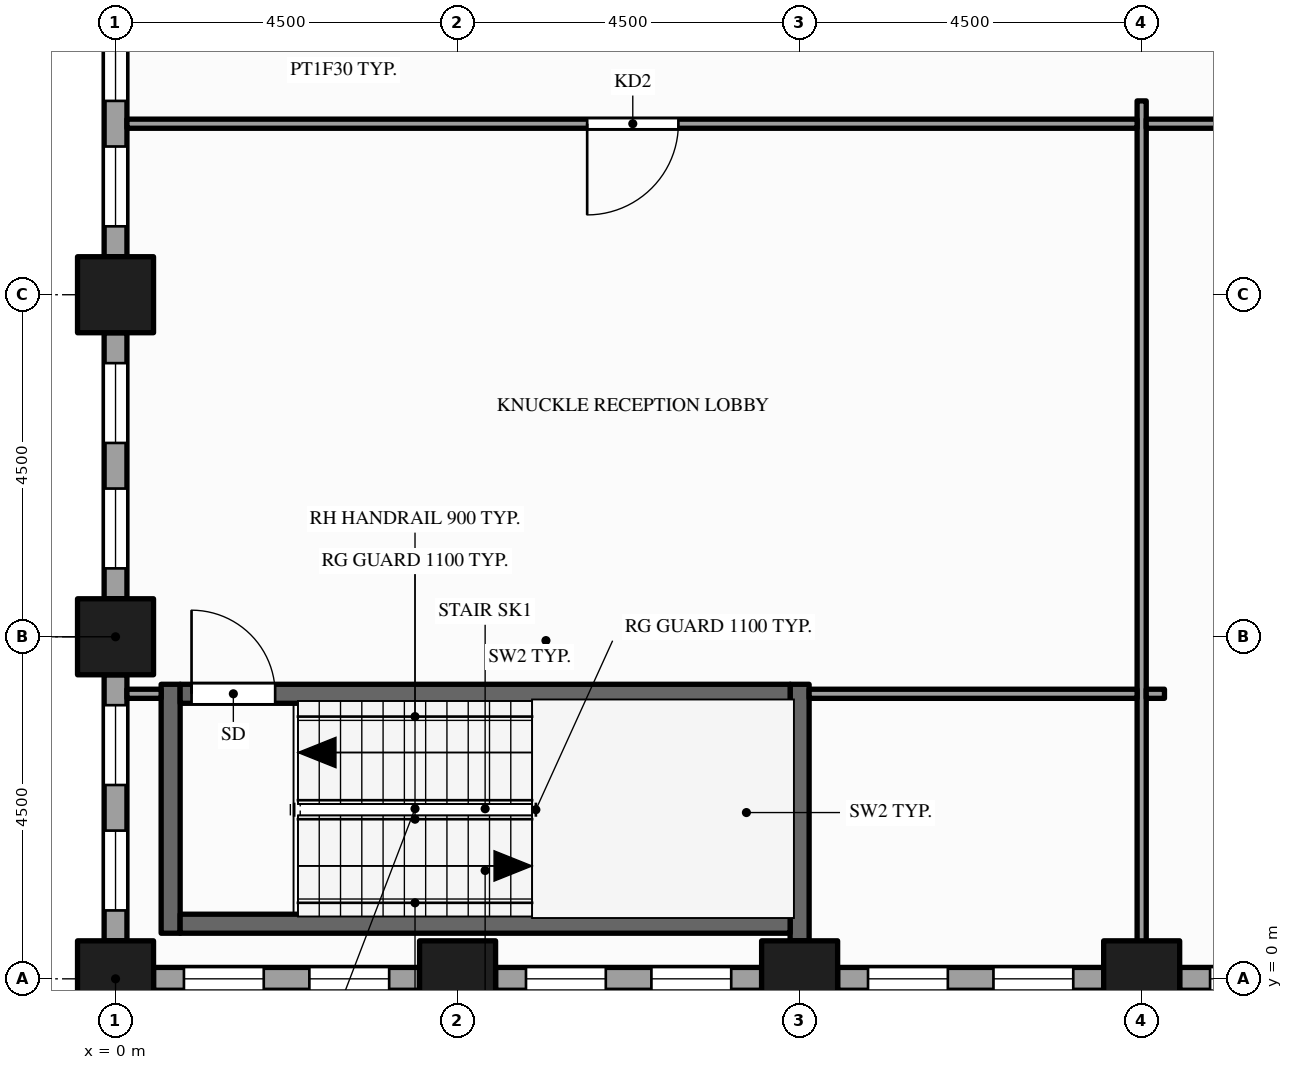
"""IFC4 building model, lengths in metres.
Left out: names, types, materials, properties, quantities, classifications, styles, units other than length and angle.
Written with IfcOpenShell. Run it as: python <this file> out.ifc"""

import sys

from ifc_helpers import new_model, si_unit, direction, frame, frame_2d, origin, origin_2d, place, context, subcontext, project, spatial, rectangle, hollow_rectangle, extrude, element, fill, save


model = new_model("IFC4")
c1 = context("Model", 3, precision=1e-05, world=origin(), true_north=direction((0.0, 1.0)))
c2 = subcontext(c1, "Body", "Model", "MODEL_VIEW")
j1 = project(units=[si_unit("LENGTHUNIT", "METRE"), si_unit("PLANEANGLEUNIT", "RADIAN")], contexts=[c1])
p1 = place(None, origin())
s1 = spatial("IfcSite", under=j1, at=p1, CompositionType="ELEMENT")
p2 = place(p1, origin())
s2 = spatial("IfcBuilding", under=s1, at=p2, CompositionType="ELEMENT")
p3 = place(p2, frame((0.0, 0.0, 123.0)))
s3 = spatial("IfcBuildingStorey", under=s2, at=p3, CompositionType="ELEMENT", Elevation=123.0)
for number, where, z_axis, x_axis in (
    (1, (0.0, 0.0, -0.15), (0.0, 0.0, 1.0), (1.0, 0.0, 0.0)),
    (2, (0.0, 4.5, -0.15), (0.0, 0.0, 1.0), (1.0, 0.0, 0.0)),
    (3, (0.0, 9.0, -0.15), (0.0, 0.0, 1.0), (1.0, 0.0, 0.0)),
    (4, (4.5, 0.0, -0.15), (0.0, 0.0, 1.0), (1.0, 0.0, 0.0)),
    (5, (9.0, 0.0, -0.15), (0.0, 0.0, 1.0), (1.0, 0.0, 0.0)),
    (6, (13.5, 0.0, -0.15), (0.0, 0.0, 1.0), (1.0, 0.0, 0.0)),
):
    element("IfcColumn", number, at=place(p3, frame(where, z_axis=z_axis, x_axis=x_axis)), inside=s3, PredefinedType="COLUMN", context=c2, shape_type="SweptSolid", body=[
        extrude(hollow_rectangle(XDim=1.0, YDim=1.0, WallThickness=0.05, at=origin_2d()), origin(), (0.0, 0.0, 1.0), 4.0),
    ])
p4 = place(p3, frame((0.0, 13.0, 0.0), z_axis=(0.0, 0.0, 1.0), x_axis=(0.0, -1.0, 0.0)))
e7 = element("IfcWall", 7, at=p4, inside=s3, PredefinedType="STANDARD", context=c2, shape_type="SweptSolid", body=[
    extrude(rectangle(XDim=3.5, YDim=0.3, at=frame_2d((1.75, 0.0))), origin(), (0.0, 0.0, 1.0), 3.154),
])
p5 = place(p4, frame((0.4, 0.0, 0.9)))
e8 = element("IfcOpeningElement", 8, at=p5, cuts=e7, PredefinedType="OPENING", context=c2, shape_type="SweptSolid", body=[
    extrude(rectangle(XDim=1.05, YDim=2.0, at=frame_2d((0.525, 1.0))), frame((0.0, 0.16, 0.0), z_axis=(0.0, -1.0, 0.0), x_axis=(1.0, 0.0, 0.0)), (0.0, 0.0, 1.0), 0.32),
])
p6 = place(p4, frame((2.05, 0.0, 0.9)))
e9 = element("IfcOpeningElement", 9, at=p6, cuts=e7, PredefinedType="OPENING", context=c2, shape_type="SweptSolid", body=[
    extrude(rectangle(XDim=1.05, YDim=2.0, at=frame_2d((0.525, 1.0))), frame((0.0, 0.16, 0.0), z_axis=(0.0, -1.0, 0.0), x_axis=(1.0, 0.0, 0.0)), (0.0, 0.0, 1.0), 0.32),
])
p7 = place(p3, frame((0.0, 8.5, 0.0), z_axis=(0.0, 0.0, 1.0), x_axis=(0.0, -1.0, 0.0)))
e10 = element("IfcWall", 10, at=p7, inside=s3, PredefinedType="STANDARD", context=c2, shape_type="SweptSolid", body=[
    extrude(rectangle(XDim=3.5, YDim=0.3, at=frame_2d((1.75, 0.0))), origin(), (0.0, 0.0, 1.0), 3.154),
])
p8 = place(p7, frame((0.4, 0.0, 0.9)))
e11 = element("IfcOpeningElement", 11, at=p8, cuts=e10, PredefinedType="OPENING", context=c2, shape_type="SweptSolid", body=[
    extrude(rectangle(XDim=1.05, YDim=2.0, at=frame_2d((0.525, 1.0))), frame((0.0, 0.16, 0.0), z_axis=(0.0, -1.0, 0.0), x_axis=(1.0, 0.0, 0.0)), (0.0, 0.0, 1.0), 0.32),
])
p9 = place(p7, frame((2.05, 0.0, 0.9)))
e12 = element("IfcOpeningElement", 12, at=p9, cuts=e10, PredefinedType="OPENING", context=c2, shape_type="SweptSolid", body=[
    extrude(rectangle(XDim=1.05, YDim=2.0, at=frame_2d((0.525, 1.0))), frame((0.0, 0.16, 0.0), z_axis=(0.0, -1.0, 0.0), x_axis=(1.0, 0.0, 0.0)), (0.0, 0.0, 1.0), 0.32),
])
p10 = place(p3, frame((0.0, 4.0, 0.0), z_axis=(0.0, 0.0, 1.0), x_axis=(0.0, -1.0, 0.0)))
e13 = element("IfcWall", 13, at=p10, inside=s3, PredefinedType="STANDARD", context=c2, shape_type="SweptSolid", body=[
    extrude(rectangle(XDim=3.5, YDim=0.3, at=frame_2d((1.75, 0.0))), origin(), (0.0, 0.0, 1.0), 3.154),
])
p11 = place(p10, frame((0.4, 0.0, 0.9)))
e14 = element("IfcOpeningElement", 14, at=p11, cuts=e13, PredefinedType="OPENING", context=c2, shape_type="SweptSolid", body=[
    extrude(rectangle(XDim=1.05, YDim=2.0, at=frame_2d((0.525, 1.0))), frame((0.0, 0.16, 0.0), z_axis=(0.0, -1.0, 0.0), x_axis=(1.0, 0.0, 0.0)), (0.0, 0.0, 1.0), 0.32),
])
p12 = place(p10, frame((2.05, 0.0, 0.9)))
e15 = element("IfcOpeningElement", 15, at=p12, cuts=e13, PredefinedType="OPENING", context=c2, shape_type="SweptSolid", body=[
    extrude(rectangle(XDim=1.05, YDim=2.0, at=frame_2d((0.525, 1.0))), frame((0.0, 0.16, 0.0), z_axis=(0.0, -1.0, 0.0), x_axis=(1.0, 0.0, 0.0)), (0.0, 0.0, 1.0), 0.32),
])
p13 = place(p3, frame((0.5, 0.0, 0.0), z_axis=(0.0, 0.0, 1.0), x_axis=(1.0, 0.0, 0.0)))
e16 = element("IfcWall", 16, at=p13, inside=s3, PredefinedType="STANDARD", context=c2, shape_type="SweptSolid", body=[
    extrude(rectangle(XDim=3.5, YDim=0.3, at=frame_2d((1.75, 0.0))), origin(), (0.0, 0.0, 1.0), 3.154),
])
p14 = place(p13, frame((0.4, 0.0, 0.9)))
e17 = element("IfcOpeningElement", 17, at=p14, cuts=e16, PredefinedType="OPENING", context=c2, shape_type="SweptSolid", body=[
    extrude(rectangle(XDim=1.05, YDim=2.0, at=frame_2d((0.525, 1.0))), frame((0.0, 0.16, 0.0), z_axis=(0.0, -1.0, 0.0), x_axis=(1.0, 0.0, 0.0)), (0.0, 0.0, 1.0), 0.32),
])
p15 = place(p13, frame((2.05, 0.0, 0.9)))
e18 = element("IfcOpeningElement", 18, at=p15, cuts=e16, PredefinedType="OPENING", context=c2, shape_type="SweptSolid", body=[
    extrude(rectangle(XDim=1.05, YDim=2.0, at=frame_2d((0.525, 1.0))), frame((0.0, 0.16, 0.0), z_axis=(0.0, -1.0, 0.0), x_axis=(1.0, 0.0, 0.0)), (0.0, 0.0, 1.0), 0.32),
])
p16 = place(p3, frame((5.0, 0.0, 0.0), z_axis=(0.0, 0.0, 1.0), x_axis=(1.0, 0.0, 0.0)))
e19 = element("IfcWall", 19, at=p16, inside=s3, PredefinedType="STANDARD", context=c2, shape_type="SweptSolid", body=[
    extrude(rectangle(XDim=3.5, YDim=0.3, at=frame_2d((1.75, 0.0))), origin(), (0.0, 0.0, 1.0), 3.154),
])
p17 = place(p16, frame((0.4, 0.0, 0.9)))
e20 = element("IfcOpeningElement", 20, at=p17, cuts=e19, PredefinedType="OPENING", context=c2, shape_type="SweptSolid", body=[
    extrude(rectangle(XDim=1.05, YDim=2.0, at=frame_2d((0.525, 1.0))), frame((0.0, 0.16, 0.0), z_axis=(0.0, -1.0, 0.0), x_axis=(1.0, 0.0, 0.0)), (0.0, 0.0, 1.0), 0.32),
])
p18 = place(p16, frame((2.05, 0.0, 0.9)))
e21 = element("IfcOpeningElement", 21, at=p18, cuts=e19, PredefinedType="OPENING", context=c2, shape_type="SweptSolid", body=[
    extrude(rectangle(XDim=1.05, YDim=2.0, at=frame_2d((0.525, 1.0))), frame((0.0, 0.16, 0.0), z_axis=(0.0, -1.0, 0.0), x_axis=(1.0, 0.0, 0.0)), (0.0, 0.0, 1.0), 0.32),
])
p19 = place(p3, frame((9.5, 0.0, 0.0), z_axis=(0.0, 0.0, 1.0), x_axis=(1.0, 0.0, 0.0)))
e22 = element("IfcWall", 22, at=p19, inside=s3, PredefinedType="STANDARD", context=c2, shape_type="SweptSolid", body=[
    extrude(rectangle(XDim=3.5, YDim=0.3, at=frame_2d((1.75, 0.0))), origin(), (0.0, 0.0, 1.0), 3.154),
])
p20 = place(p19, frame((0.4, 0.0, 0.9)))
e23 = element("IfcOpeningElement", 23, at=p20, cuts=e22, PredefinedType="OPENING", context=c2, shape_type="SweptSolid", body=[
    extrude(rectangle(XDim=1.05, YDim=2.0, at=frame_2d((0.525, 1.0))), frame((0.0, 0.16, 0.0), z_axis=(0.0, -1.0, 0.0), x_axis=(1.0, 0.0, 0.0)), (0.0, 0.0, 1.0), 0.32),
])
p21 = place(p19, frame((2.05, 0.0, 0.9)))
e24 = element("IfcOpeningElement", 24, at=p21, cuts=e22, PredefinedType="OPENING", context=c2, shape_type="SweptSolid", body=[
    extrude(rectangle(XDim=1.05, YDim=2.0, at=frame_2d((0.525, 1.0))), frame((0.0, 0.16, 0.0), z_axis=(0.0, -1.0, 0.0), x_axis=(1.0, 0.0, 0.0)), (0.0, 0.0, 1.0), 0.32),
])
p22 = place(p3, frame((14.0, 0.0, 0.0), z_axis=(0.0, 0.0, 1.0), x_axis=(1.0, 0.0, 0.0)))
e25 = element("IfcWall", 25, at=p22, inside=s3, PredefinedType="STANDARD", context=c2, shape_type="SweptSolid", body=[
    extrude(rectangle(XDim=3.5, YDim=0.3, at=frame_2d((1.75, 0.0))), origin(), (0.0, 0.0, 1.0), 3.154),
])
p23 = place(p22, frame((0.4, 0.0, 0.9)))
e26 = element("IfcOpeningElement", 26, at=p23, cuts=e25, PredefinedType="OPENING", context=c2, shape_type="SweptSolid", body=[
    extrude(rectangle(XDim=1.05, YDim=2.0, at=frame_2d((0.525, 1.0))), frame((0.0, 0.16, 0.0), z_axis=(0.0, -1.0, 0.0), x_axis=(1.0, 0.0, 0.0)), (0.0, 0.0, 1.0), 0.32),
])
p24 = place(p22, frame((2.05, 0.0, 0.9)))
e27 = element("IfcOpeningElement", 27, at=p24, cuts=e25, PredefinedType="OPENING", context=c2, shape_type="SweptSolid", body=[
    extrude(rectangle(XDim=1.05, YDim=2.0, at=frame_2d((0.525, 1.0))), frame((0.0, 0.16, 0.0), z_axis=(0.0, -1.0, 0.0), x_axis=(1.0, 0.0, 0.0)), (0.0, 0.0, 1.0), 0.32),
])
p25 = place(p3, frame((0.725, 0.6, 0.0), z_axis=(0.0, 0.0, 1.0), x_axis=(0.0, 1.0, 0.0)))
e28 = element("IfcWall", 28, at=p25, inside=s3, PredefinedType="SHEAR", context=c2, shape_type="SweptSolid", body=[
    extrude(rectangle(XDim=3.275, YDim=0.25, at=frame_2d((1.637, 0.0))), origin(), (0.0, 0.0, 1.0), 3.85),
])
p26 = place(p3, frame((9.0, 0.5, 0.0), z_axis=(0.0, 0.0, 1.0), x_axis=(0.0, 1.0, 0.0)))
e29 = element("IfcWall", 29, at=p26, inside=s3, PredefinedType="SHEAR", context=c2, shape_type="SweptSolid", body=[
    extrude(rectangle(XDim=3.375, YDim=0.25, at=frame_2d((1.688, 0.0))), origin(), (0.0, 0.0, 1.0), 3.85),
])
p27 = place(p3, frame((13.5, 0.15, 0.0), z_axis=(0.0, 0.0, 1.0), x_axis=(0.0, 1.0, 0.0)))
e30 = element("IfcWall", 30, at=p27, inside=s3, PredefinedType="PARTITIONING", context=c2, shape_type="SweptSolid", body=[
    extrude(rectangle(XDim=11.4, YDim=0.12, at=frame_2d((5.7, 0.0))), origin(), (0.0, 0.0, 1.0), 2.938),
])
p28 = place(p3, frame((0.85, 0.725, 0.0), z_axis=(0.0, 0.0, 1.0), x_axis=(1.0, 0.0, 0.0)))
e31 = element("IfcWall", 31, at=p28, inside=s3, PredefinedType="SHEAR", context=c2, shape_type="SweptSolid", body=[
    extrude(rectangle(XDim=8.025, YDim=0.25, at=frame_2d((4.012, 0.0))), origin(), (0.0, 0.0, 1.0), 3.85),
])
p29 = place(p3, frame((0.15, 3.75, 0.0), z_axis=(0.0, 0.0, 1.0), x_axis=(1.0, 0.0, 0.0)))
e32 = element("IfcWall", 32, at=p29, inside=s3, PredefinedType="PARTITIONING", context=c2, shape_type="SweptSolid", body=[
    extrude(rectangle(XDim=0.45, YDim=0.12, at=frame_2d((0.225, 0.0))), origin(), (0.0, 0.0, 1.0), 3.154),
])
p30 = place(p3, frame((0.85, 3.75, 0.0), z_axis=(0.0, 0.0, 1.0), x_axis=(1.0, 0.0, 0.0)))
e33 = element("IfcWall", 33, at=p30, inside=s3, PredefinedType="SHEAR", context=c2, shape_type="SweptSolid", body=[
    extrude(rectangle(XDim=8.025, YDim=0.25, at=frame_2d((4.012, 0.0))), origin(), (0.0, 0.0, 1.0), 3.85),
])
p31 = place(p30, frame((0.15, 0.0, 0.0)))
e34 = element("IfcOpeningElement", 34, at=p31, cuts=e33, PredefinedType="OPENING", context=c2, shape_type="SweptSolid", body=[
    extrude(rectangle(XDim=1.1, YDim=2.1, at=frame_2d((0.55, 1.05))), frame((0.0, 0.135, 0.0), z_axis=(0.0, -1.0, 0.0), x_axis=(1.0, 0.0, 0.0)), (0.0, 0.0, 1.0), 0.27),
])
p32 = place(p3, frame((9.125, 3.75, 0.0), z_axis=(0.0, 0.0, 1.0), x_axis=(1.0, 0.0, 0.0)))
e35 = element("IfcWall", 35, at=p32, inside=s3, PredefinedType="PARTITIONING", context=c2, shape_type="SweptSolid", body=[
    extrude(rectangle(XDim=4.315, YDim=0.12, at=frame_2d((2.157, 0.0))), origin(), (0.0, 0.0, 1.0), 2.938),
])
p33 = place(p3, frame((13.56, 3.75, 0.0), z_axis=(0.0, 0.0, 1.0), x_axis=(1.0, 0.0, 0.0)))
e36 = element("IfcWall", 36, at=p33, inside=s3, PredefinedType="PARTITIONING", context=c2, shape_type="SweptSolid", body=[
    extrude(rectangle(XDim=0.24, YDim=0.12, at=frame_2d((0.12, 0.0))), origin(), (0.0, 0.0, 1.0), 2.938),
])
p34 = place(p3, frame((0.15, 11.25, 0.0), z_axis=(0.0, 0.0, 1.0), x_axis=(1.0, 0.0, 0.0)))
e37 = element("IfcWall", 37, at=p34, inside=s3, PredefinedType="PARTITIONING", context=c2, shape_type="SweptSolid", body=[
    extrude(rectangle(XDim=13.29, YDim=0.12, at=frame_2d((6.645, 0.0))), origin(), (0.0, 0.0, 1.0), 2.938),
])
p35 = place(p34, frame((6.055, 0.0, 0.0)))
e38 = element("IfcOpeningElement", 38, at=p35, cuts=e37, PredefinedType="OPENING", context=c2, shape_type="SweptSolid", body=[
    extrude(rectangle(XDim=1.2, YDim=2.1, at=frame_2d((0.6, 1.05))), frame((0.0, 0.07, 0.0), z_axis=(0.0, -1.0, 0.0), x_axis=(1.0, 0.0, 0.0)), (0.0, 0.0, 1.0), 0.14),
])
p36 = place(p3, frame((13.56, 11.25, 0.0), z_axis=(0.0, 0.0, 1.0), x_axis=(1.0, 0.0, 0.0)))
e39 = element("IfcWall", 39, at=p36, inside=s3, PredefinedType="PARTITIONING", context=c2, shape_type="SweptSolid", body=[
    extrude(rectangle(XDim=6.63, YDim=0.12, at=frame_2d((3.315, 0.0))), origin(), (0.0, 0.0, 1.0), 2.938),
])
p37 = place(p36, frame((2.815, 0.0, 0.0)))
e40 = element("IfcOpeningElement", 40, at=p37, cuts=e39, PredefinedType="OPENING", context=c2, shape_type="SweptSolid", body=[
    extrude(rectangle(XDim=1.0, YDim=2.1, at=frame_2d((0.5, 1.05))), frame((0.0, 0.07, 0.0), z_axis=(0.0, -1.0, 0.0), x_axis=(1.0, 0.0, 0.0)), (0.0, 0.0, 1.0), 0.14),
])
p38 = place(p5, origin())
e41 = element("IfcWindow", 41, at=p38, inside=s3, PartitioningType="SINGLE_PANEL", PredefinedType="WINDOW", context=c2, shape_type="SweptSolid", body=[
    extrude(rectangle(XDim=1.05, YDim=2.0, at=frame_2d((0.525, 1.0))), frame((0.0, 0.03, 0.0), z_axis=(0.0, -1.0, 0.0), x_axis=(1.0, 0.0, 0.0)), (0.0, 0.0, 1.0), 0.06),
])
fill(e8, e41)
p39 = place(p6, origin())
e42 = element("IfcWindow", 42, at=p39, inside=s3, PartitioningType="SINGLE_PANEL", PredefinedType="WINDOW", context=c2, shape_type="SweptSolid", body=[
    extrude(rectangle(XDim=1.05, YDim=2.0, at=frame_2d((0.525, 1.0))), frame((0.0, 0.03, 0.0), z_axis=(0.0, -1.0, 0.0), x_axis=(1.0, 0.0, 0.0)), (0.0, 0.0, 1.0), 0.06),
])
fill(e9, e42)
p40 = place(p8, origin())
e43 = element("IfcWindow", 43, at=p40, inside=s3, PartitioningType="SINGLE_PANEL", PredefinedType="WINDOW", context=c2, shape_type="SweptSolid", body=[
    extrude(rectangle(XDim=1.05, YDim=2.0, at=frame_2d((0.525, 1.0))), frame((0.0, 0.03, 0.0), z_axis=(0.0, -1.0, 0.0), x_axis=(1.0, 0.0, 0.0)), (0.0, 0.0, 1.0), 0.06),
])
fill(e11, e43)
p41 = place(p9, origin())
e44 = element("IfcWindow", 44, at=p41, inside=s3, PartitioningType="SINGLE_PANEL", PredefinedType="WINDOW", context=c2, shape_type="SweptSolid", body=[
    extrude(rectangle(XDim=1.05, YDim=2.0, at=frame_2d((0.525, 1.0))), frame((0.0, 0.03, 0.0), z_axis=(0.0, -1.0, 0.0), x_axis=(1.0, 0.0, 0.0)), (0.0, 0.0, 1.0), 0.06),
])
fill(e12, e44)
p42 = place(p11, origin())
e45 = element("IfcWindow", 45, at=p42, inside=s3, PartitioningType="SINGLE_PANEL", PredefinedType="WINDOW", context=c2, shape_type="SweptSolid", body=[
    extrude(rectangle(XDim=1.05, YDim=2.0, at=frame_2d((0.525, 1.0))), frame((0.0, 0.03, 0.0), z_axis=(0.0, -1.0, 0.0), x_axis=(1.0, 0.0, 0.0)), (0.0, 0.0, 1.0), 0.06),
])
fill(e14, e45)
p43 = place(p12, origin())
e46 = element("IfcWindow", 46, at=p43, inside=s3, PartitioningType="SINGLE_PANEL", PredefinedType="WINDOW", context=c2, shape_type="SweptSolid", body=[
    extrude(rectangle(XDim=1.05, YDim=2.0, at=frame_2d((0.525, 1.0))), frame((0.0, 0.03, 0.0), z_axis=(0.0, -1.0, 0.0), x_axis=(1.0, 0.0, 0.0)), (0.0, 0.0, 1.0), 0.06),
])
fill(e15, e46)
p44 = place(p14, origin())
e47 = element("IfcWindow", 47, at=p44, inside=s3, PartitioningType="SINGLE_PANEL", PredefinedType="WINDOW", context=c2, shape_type="SweptSolid", body=[
    extrude(rectangle(XDim=1.05, YDim=2.0, at=frame_2d((0.525, 1.0))), frame((0.0, 0.03, 0.0), z_axis=(0.0, -1.0, 0.0), x_axis=(1.0, 0.0, 0.0)), (0.0, 0.0, 1.0), 0.06),
])
fill(e17, e47)
p45 = place(p15, origin())
e48 = element("IfcWindow", 48, at=p45, inside=s3, PartitioningType="SINGLE_PANEL", PredefinedType="WINDOW", context=c2, shape_type="SweptSolid", body=[
    extrude(rectangle(XDim=1.05, YDim=2.0, at=frame_2d((0.525, 1.0))), frame((0.0, 0.03, 0.0), z_axis=(0.0, -1.0, 0.0), x_axis=(1.0, 0.0, 0.0)), (0.0, 0.0, 1.0), 0.06),
])
fill(e18, e48)
p46 = place(p17, origin())
e49 = element("IfcWindow", 49, at=p46, inside=s3, PartitioningType="SINGLE_PANEL", PredefinedType="WINDOW", context=c2, shape_type="SweptSolid", body=[
    extrude(rectangle(XDim=1.05, YDim=2.0, at=frame_2d((0.525, 1.0))), frame((0.0, 0.03, 0.0), z_axis=(0.0, -1.0, 0.0), x_axis=(1.0, 0.0, 0.0)), (0.0, 0.0, 1.0), 0.06),
])
fill(e20, e49)
p47 = place(p18, origin())
e50 = element("IfcWindow", 50, at=p47, inside=s3, PartitioningType="SINGLE_PANEL", PredefinedType="WINDOW", context=c2, shape_type="SweptSolid", body=[
    extrude(rectangle(XDim=1.05, YDim=2.0, at=frame_2d((0.525, 1.0))), frame((0.0, 0.03, 0.0), z_axis=(0.0, -1.0, 0.0), x_axis=(1.0, 0.0, 0.0)), (0.0, 0.0, 1.0), 0.06),
])
fill(e21, e50)
p48 = place(p20, origin())
e51 = element("IfcWindow", 51, at=p48, inside=s3, PartitioningType="SINGLE_PANEL", PredefinedType="WINDOW", context=c2, shape_type="SweptSolid", body=[
    extrude(rectangle(XDim=1.05, YDim=2.0, at=frame_2d((0.525, 1.0))), frame((0.0, 0.03, 0.0), z_axis=(0.0, -1.0, 0.0), x_axis=(1.0, 0.0, 0.0)), (0.0, 0.0, 1.0), 0.06),
])
fill(e23, e51)
p49 = place(p21, origin())
e52 = element("IfcWindow", 52, at=p49, inside=s3, PartitioningType="SINGLE_PANEL", PredefinedType="WINDOW", context=c2, shape_type="SweptSolid", body=[
    extrude(rectangle(XDim=1.05, YDim=2.0, at=frame_2d((0.525, 1.0))), frame((0.0, 0.03, 0.0), z_axis=(0.0, -1.0, 0.0), x_axis=(1.0, 0.0, 0.0)), (0.0, 0.0, 1.0), 0.06),
])
fill(e24, e52)
p50 = place(p23, origin())
e53 = element("IfcWindow", 53, at=p50, inside=s3, PartitioningType="SINGLE_PANEL", PredefinedType="WINDOW", context=c2, shape_type="SweptSolid", body=[
    extrude(rectangle(XDim=1.05, YDim=2.0, at=frame_2d((0.525, 1.0))), frame((0.0, 0.03, 0.0), z_axis=(0.0, -1.0, 0.0), x_axis=(1.0, 0.0, 0.0)), (0.0, 0.0, 1.0), 0.06),
])
fill(e26, e53)
p51 = place(p31, origin())
e54 = element("IfcDoor", 54, at=p51, inside=s3, OperationType="SINGLE_SWING_LEFT", PredefinedType="DOOR", context=c2, shape_type="SweptSolid", body=[
    extrude(rectangle(XDim=1.1, YDim=2.1, at=frame_2d((0.55, 1.05))), frame((0.0, 0.025, 0.0), z_axis=(0.0, -1.0, 0.0), x_axis=(1.0, 0.0, 0.0)), (0.0, 0.0, 1.0), 0.05),
])
fill(e34, e54)
p52 = place(p35, origin())
e55 = element("IfcDoor", 55, at=p52, inside=s3, OperationType="SINGLE_SWING_LEFT", PredefinedType="DOOR", context=c2, shape_type="SweptSolid", body=[
    extrude(rectangle(XDim=1.2, YDim=2.1, at=frame_2d((0.6, 1.05))), frame((0.0, 0.025, 0.0), z_axis=(0.0, -1.0, 0.0), x_axis=(1.0, 0.0, 0.0)), (0.0, 0.0, 1.0), 0.05),
])
fill(e38, e55)
save(model, sys.argv[1])
